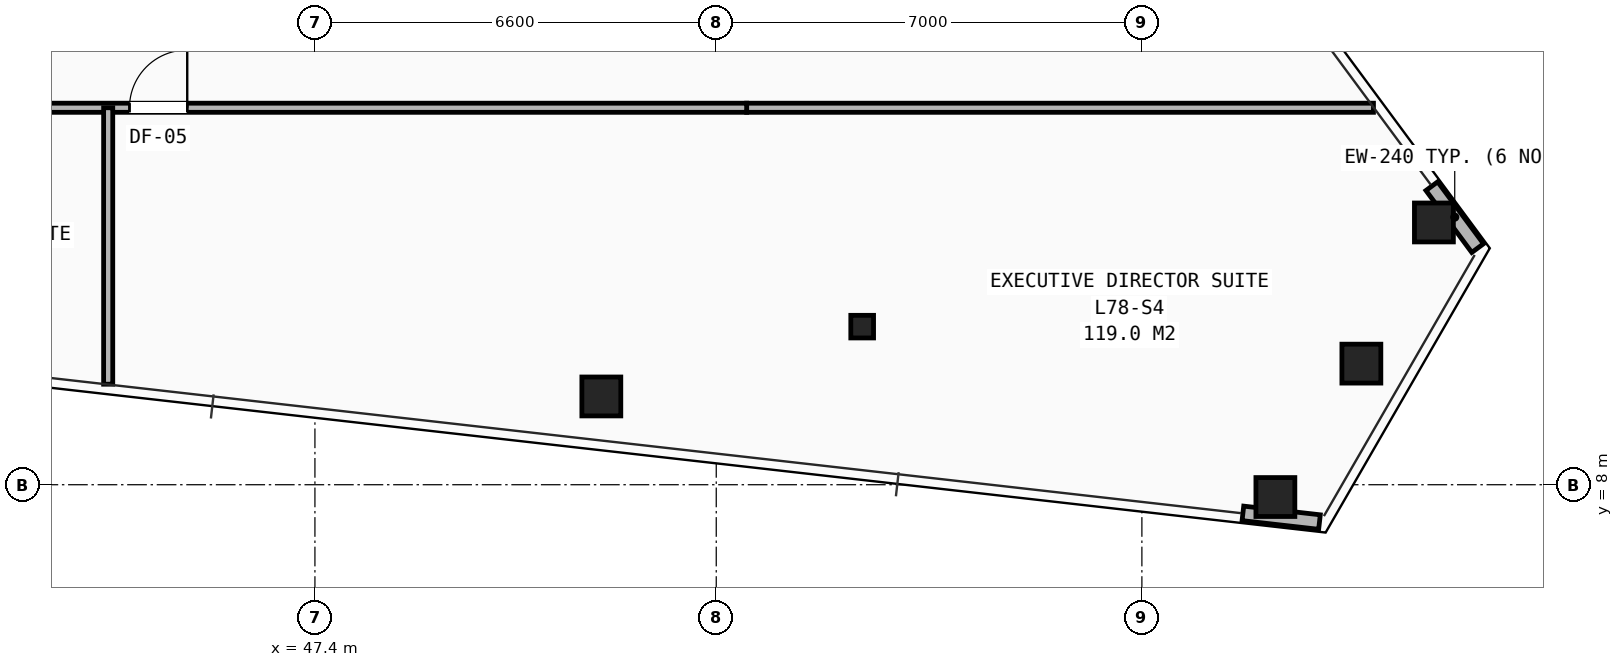
"""IFC4 building model, lengths in metres.
Left out: names, types, materials, properties, quantities, classifications, styles, units other than length and angle.
Written with IfcOpenShell. Run it as: python <this file> out.ifc"""

import sys

from ifc_helpers import new_model, si_unit, direction, frame, frame_2d, origin, origin_2d, place, context, subcontext, project, spatial, rectangle, hollow_rectangle, i_section, extrude, element, fill, save


model = new_model("IFC4")
c1 = context("Model", 3, precision=1e-05, world=origin(), true_north=direction((0.0, 1.0)))
c2 = subcontext(c1, "Body", "Model", "MODEL_VIEW")
j1 = project(units=[si_unit("LENGTHUNIT", "METRE"), si_unit("PLANEANGLEUNIT", "RADIAN")], contexts=[c1])
p1 = place(None, origin())
s1 = spatial("IfcSite", under=j1, at=p1, CompositionType="ELEMENT")
p2 = place(p1, origin())
s2 = spatial("IfcBuilding", under=s1, at=p2, CompositionType="ELEMENT")
p3 = place(p2, frame((0.0, 0.0, 276.0)))
s3 = spatial("IfcBuildingStorey", under=s2, at=p3, CompositionType="ELEMENT", Elevation=276.0)
p4 = place(p3, frame((56.4, 10.6, 0.0), z_axis=(0.0, 0.0, 1.0), x_axis=(1.0, 0.0, 0.0)))
e1 = element("IfcColumn", 1, at=p4, inside=s3, PredefinedType="COLUMN", context=c2, shape_type="SweptSolid", body=[
    extrude(i_section(OverallWidth=0.374, OverallDepth=0.372, WebThickness=0.016, FlangeThickness=0.026, at=origin_2d()), origin(), (0.0, 0.0, 1.0), 3.5),
])
for number, where, z_axis, x_axis in (
    (2, (52.11, 9.452, 0.0), (0.0, 0.0, 1.0), (1.0, 0.0, 0.0)),
    (3, (63.195, 7.798, 0.0), (0.0, 0.0, 1.0), (1.0, 0.0, 0.0)),
    (4, (64.61, 9.992, 0.0), (0.0, 0.0, 1.0), (1.0, 0.0, 0.0)),
    (5, (65.802, 12.313, 0.0), (0.0, 0.0, 1.0), (1.0, 0.0, 0.0)),
):
    element("IfcColumn", number, at=place(p3, frame(where, z_axis=z_axis, x_axis=x_axis)), inside=s3, PredefinedType="COLUMN", context=c2, shape_type="SweptSolid", body=[
        extrude(hollow_rectangle(XDim=0.64, YDim=0.64, WallThickness=0.045, at=origin_2d()), origin(), (0.0, 0.0, 1.0), 3.5),
    ])
p5 = place(p3, frame((62.661, 7.529, 0.0), z_axis=(0.0, 0.0, 1.0), x_axis=(0.993610655419, -0.11286215237, 0.0)))
e6 = element("IfcWall", 6, at=p5, inside=s3, PredefinedType="SHEAR", context=c2, shape_type="SweptSolid", body=[
    extrude(rectangle(XDim=1.268, YDim=0.24, at=frame_2d((0.634, 0.0))), origin(), (0.0, 0.0, 1.0), 2.623),
])
p6 = place(p3, frame((66.522, 11.891, 0.0), z_axis=(0.0, 0.0, 1.0), x_axis=(-0.594499388503, 0.804096062091, 0.0)))
e7 = element("IfcWall", 7, at=p6, inside=s3, PredefinedType="SHEAR", context=c2, shape_type="SweptSolid", body=[
    extrude(rectangle(XDim=1.267, YDim=0.24, at=frame_2d((0.634, 0.0))), origin(), (0.0, 0.0, 1.0), 2.623),
])
p7 = place(p3, frame((54.5, 14.2, 0.0), z_axis=(0.0, 0.0, 1.0), x_axis=(1.0, 0.0, 0.0)))
e8 = element("IfcWall", 8, at=p7, inside=s3, PredefinedType="PARTITIONING", context=c2, shape_type="SweptSolid", body=[
    extrude(rectangle(XDim=10.308, YDim=0.15, at=frame_2d((5.154, 0.0))), origin(), (0.0, 0.0, 1.0), 2.292),
])
p8 = place(p3, frame((25.5, 14.2, 0.0), z_axis=(0.0, 0.0, 1.0), x_axis=(1.0, 0.0, 0.0)))
e9 = element("IfcWall", 9, at=p8, inside=s3, PredefinedType="PARTITIONING", context=c2, shape_type="SweptSolid", body=[
    extrude(rectangle(XDim=29.0, YDim=0.15, at=frame_2d((14.5, 0.0))), origin(), (0.0, 0.0, 1.0), 2.292),
])
p9 = place(p8, frame((0.85, 0.0, 0.0)))
e10 = element("IfcOpeningElement", 10, at=p9, cuts=e9, PredefinedType="OPENING", context=c2, shape_type="SweptSolid", body=[
    extrude(rectangle(XDim=0.95, YDim=2.1, at=frame_2d((0.475, 1.05))), frame((0.0, 0.085, 0.0), z_axis=(0.0, -1.0, 0.0), x_axis=(1.0, 0.0, 0.0)), (0.0, 0.0, 1.0), 0.17),
])
p10 = place(p8, frame((9.05, 0.0, 0.0)))
e11 = element("IfcOpeningElement", 11, at=p10, cuts=e9, PredefinedType="OPENING", context=c2, shape_type="SweptSolid", body=[
    extrude(rectangle(XDim=0.95, YDim=2.1, at=frame_2d((0.475, 1.05))), frame((0.0, 0.085, 0.0), z_axis=(0.0, -1.0, 0.0), x_axis=(1.0, 0.0, 0.0)), (0.0, 0.0, 1.0), 0.17),
])
p11 = place(p8, frame((14.45, 0.0, 0.0)))
e12 = element("IfcOpeningElement", 12, at=p11, cuts=e9, PredefinedType="OPENING", context=c2, shape_type="SweptSolid", body=[
    extrude(rectangle(XDim=0.95, YDim=2.1, at=frame_2d((0.475, 1.05))), frame((0.0, 0.085, 0.0), z_axis=(0.0, -1.0, 0.0), x_axis=(1.0, 0.0, 0.0)), (0.0, 0.0, 1.0), 0.17),
])
p12 = place(p8, frame((18.85, 0.0, 0.0)))
e13 = element("IfcOpeningElement", 13, at=p12, cuts=e9, PredefinedType="OPENING", context=c2, shape_type="SweptSolid", body=[
    extrude(rectangle(XDim=0.95, YDim=2.1, at=frame_2d((0.475, 1.05))), frame((0.0, 0.085, 0.0), z_axis=(0.0, -1.0, 0.0), x_axis=(1.0, 0.0, 0.0)), (0.0, 0.0, 1.0), 0.17),
])
p13 = place(p3, frame((44.0, 9.653, 0.0), z_axis=(0.0, 0.0, 1.0), x_axis=(0.0, 1.0, 0.0)))
e14 = element("IfcWall", 14, at=p13, inside=s3, PredefinedType="PARTITIONING", context=c2, shape_type="SweptSolid", body=[
    extrude(rectangle(XDim=4.547, YDim=0.15, at=frame_2d((2.273, 0.0))), origin(), (0.0, 0.0, 1.0), 2.628),
])
p14 = place(p12, origin())
e15 = element("IfcDoor", 15, at=p14, inside=s3, OperationType="SINGLE_SWING_RIGHT", PredefinedType="DOOR", context=c2, shape_type="SweptSolid", body=[
    extrude(rectangle(XDim=0.95, YDim=2.1, at=frame_2d((0.475, 1.05))), frame((0.0, 0.025, 0.0), z_axis=(0.0, -1.0, 0.0), x_axis=(1.0, 0.0, 0.0)), (0.0, 0.0, 1.0), 0.05),
])
fill(e13, e15)
save(model, sys.argv[1])
